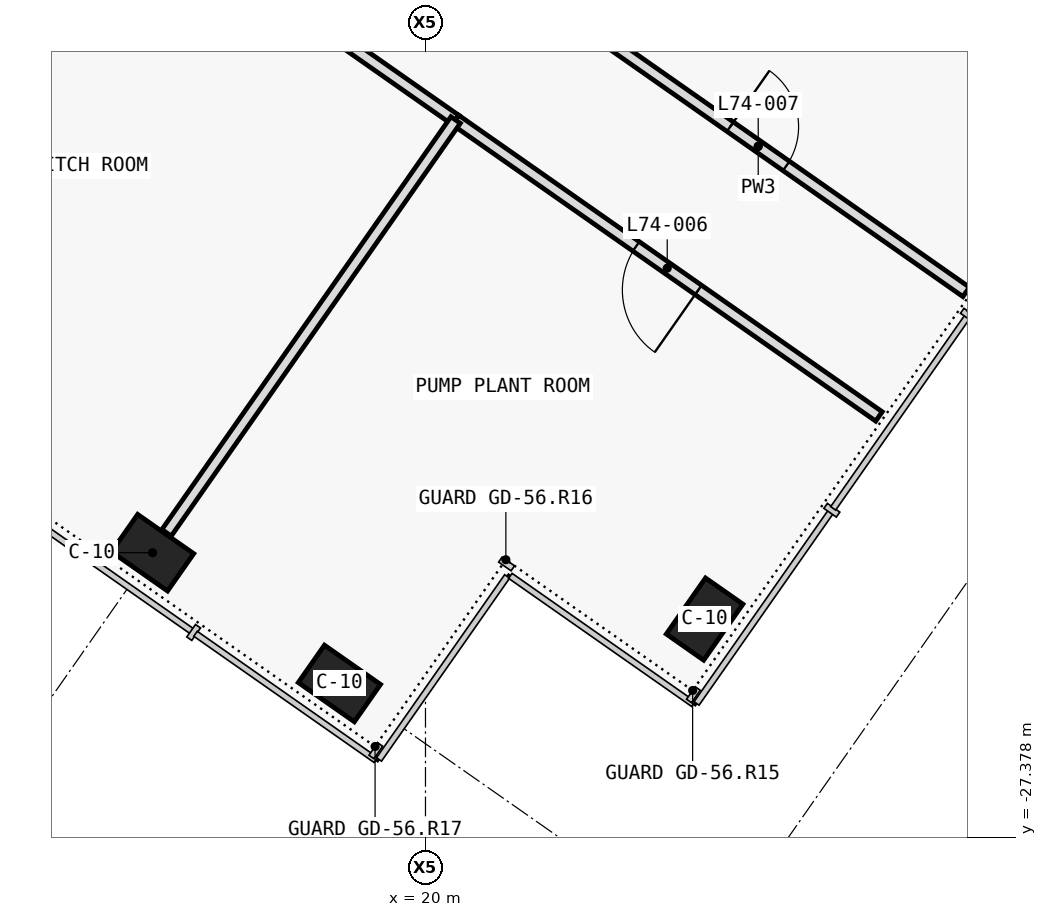
"""IFC4 building model, lengths in metres.
Left out: names, types, materials, properties, quantities, classifications, styles, units other than length and angle.
Written with IfcOpenShell. Run it as: python <this file> out.ifc"""

import sys

from ifc_helpers import new_model, si_unit, direction, frame, frame_2d, origin, origin_2d, place, context, subcontext, project, spatial, rectangle, extrude, element, fill, save


model = new_model("IFC4")
c1 = context("Model", 3, precision=1e-05, world=origin(), true_north=direction((0.0, 1.0)))
c2 = subcontext(c1, "Body", "Model", "MODEL_VIEW")
j1 = project(units=[si_unit("LENGTHUNIT", "METRE"), si_unit("PLANEANGLEUNIT", "RADIAN")], contexts=[c1])
p1 = place(None, origin())
s1 = spatial("IfcSite", under=j1, at=p1, CompositionType="ELEMENT")
p2 = place(p1, origin())
s2 = spatial("IfcBuilding", under=s1, at=p2, CompositionType="ELEMENT")
p3 = place(p2, frame((0.0, 0.0, 313.3)))
s3 = spatial("IfcBuildingStorey", under=s2, at=p3, CompositionType="ELEMENT", Elevation=313.3)
for number, where, z_axis, x_axis in (
    (1, (16.41, -23.637, 0.0), (0.0, 0.0, 1.0), (0.819, -0.574, 0.0)),
    (2, (18.867, -25.358, 0.0), (0.0, 0.0, 1.0), (0.819, -0.574, 0.0)),
    (3, (23.672, -24.51, 0.0), (0.0, 0.0, 1.0), (0.574, 0.819, 0.0)),
):
    element("IfcColumn", number, at=place(p3, frame(where, z_axis=z_axis, x_axis=x_axis)), inside=s3, PredefinedType="COLUMN", context=c2, shape_type="SweptSolid", body=[
        extrude(rectangle(XDim=0.9, YDim=0.6, at=origin_2d()), origin(), (0.0, 0.0, 1.0), 5.5),
    ])
p4 = place(p3, frame((21.642, -16.375, 0.0), z_axis=(0.0, 0.0, 1.0), x_axis=(0.819147777977, -0.573582529227, 0.0)))
e4 = element("IfcWall", 4, at=p4, inside=s3, PredefinedType="PARTITIONING", context=c2, shape_type="SweptSolid", body=[
    extrude(rectangle(XDim=6.68, YDim=0.15, at=frame_2d((3.34, 0.0))), origin(), (0.0, 0.0, 1.0), 5.2),
])
p5 = place(p4, frame((2.89, 0.0, 0.0)))
e5 = element("IfcOpeningElement", 5, at=p5, cuts=e4, PredefinedType="OPENING", context=c2, shape_type="SweptSolid", body=[
    extrude(rectangle(XDim=0.9, YDim=2.1, at=frame_2d((0.45, 1.05))), frame((0.0, 0.085, 0.0), z_axis=(0.0, -1.0, 0.0), x_axis=(1.0, 0.0, 0.0)), (0.0, 0.0, 1.0), 0.17),
])
p6 = place(p3, frame((20.398, -17.945, 0.0), z_axis=(0.0, 0.0, 1.0), x_axis=(-0.819142740634, 0.573589723117, 0.0)))
e6 = element("IfcWall", 6, at=p6, inside=s3, PredefinedType="PARTITIONING", context=c2, shape_type="SweptSolid", body=[
    extrude(rectangle(XDim=9.004, YDim=0.15, at=frame_2d((4.502, 0.0))), origin(), (0.0, 0.0, 1.0), 5.2),
])
p7 = place(p6, frame((4.002, 0.0, 0.0)))
e7 = element("IfcOpeningElement", 7, at=p7, cuts=e6, PredefinedType="OPENING", context=c2, shape_type="SweptSolid", body=[
    extrude(rectangle(XDim=1.0, YDim=2.1, at=frame_2d((0.5, 1.05))), frame((0.0, 0.085, 0.0), z_axis=(0.0, -1.0, 0.0), x_axis=(1.0, 0.0, 0.0)), (0.0, 0.0, 1.0), 0.17),
])
p8 = place(p3, frame((25.967, -21.844, 0.0), z_axis=(0.0, 0.0, 1.0), x_axis=(-0.819154345195, 0.573573150303, 0.0)))
e8 = element("IfcWall", 8, at=p8, inside=s3, PredefinedType="PARTITIONING", context=c2, shape_type="SweptSolid", body=[
    extrude(rectangle(XDim=6.802, YDim=0.15, at=frame_2d((3.401, 0.0))), origin(), (0.0, 0.0, 1.0), 5.2),
])
p9 = place(p8, frame((2.901, 0.0, 0.0)))
e9 = element("IfcOpeningElement", 9, at=p9, cuts=e8, PredefinedType="OPENING", context=c2, shape_type="SweptSolid", body=[
    extrude(rectangle(XDim=1.0, YDim=2.1, at=frame_2d((0.5, 1.05))), frame((0.0, 0.085, 0.0), z_axis=(0.0, -1.0, 0.0), x_axis=(1.0, 0.0, 0.0)), (0.0, 0.0, 1.0), 0.17),
])
p10 = place(p3, frame((20.396, -17.944, 0.0), z_axis=(0.0, 0.0, 1.0), x_axis=(-0.57359826181, -0.819136761505, 0.0)))
e10 = element("IfcWall", 10, at=p10, inside=s3, PredefinedType="PARTITIONING", context=c2, shape_type="SweptSolid", body=[
    extrude(rectangle(XDim=6.63, YDim=0.15, at=frame_2d((3.315, 0.0))), origin(), (0.0, 0.0, 1.0), 5.2),
])
p11 = place(p9, origin())
e11 = element("IfcDoor", 11, at=p11, inside=s3, OperationType="SINGLE_SWING_RIGHT", PredefinedType="DOOR", context=c2, shape_type="SweptSolid", body=[
    extrude(rectangle(XDim=1.0, YDim=2.1, at=frame_2d((0.5, 1.05))), frame((0.0, 0.025, 0.0), z_axis=(0.0, -1.0, 0.0), x_axis=(1.0, 0.0, 0.0)), (0.0, 0.0, 1.0), 0.05),
])
fill(e9, e11)
p12 = place(p5, origin())
e12 = element("IfcDoor", 12, at=p12, inside=s3, OperationType="SINGLE_SWING_RIGHT", PredefinedType="DOOR", context=c2, shape_type="SweptSolid", body=[
    extrude(rectangle(XDim=0.9, YDim=2.1, at=frame_2d((0.45, 1.05))), frame((0.0, 0.025, 0.0), z_axis=(0.0, -1.0, 0.0), x_axis=(1.0, 0.0, 0.0)), (0.0, 0.0, 1.0), 0.05),
])
fill(e5, e12)
save(model, sys.argv[1])
